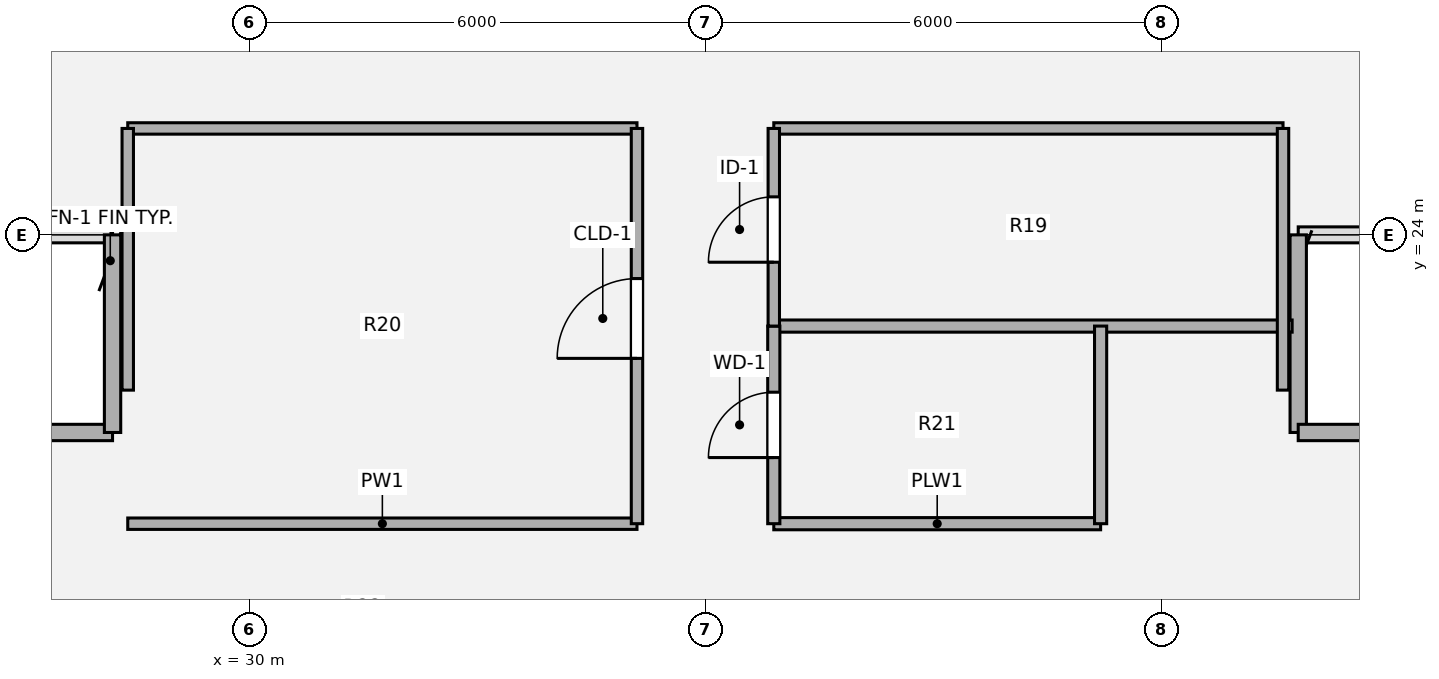
"""IFC4 building model, lengths in metres.
Left out: names, types, materials, properties, quantities, classifications, styles, units other than length and angle.
Written with IfcOpenShell. Run it as: python <this file> out.ifc"""

import sys

from ifc_helpers import new_model, si_unit, direction, frame, frame_2d, origin, origin_2d, place, context, subcontext, project, spatial, rectangle, extrude, source, transform, mapped, element, fill, save


model = new_model("IFC4")
c1 = context("Model", 3, precision=1e-05, world=origin(), true_north=direction((0.0, 1.0)))
c2 = subcontext(c1, "Body", "Model", "MODEL_VIEW")
j1 = project(units=[si_unit("LENGTHUNIT", "METRE"), si_unit("PLANEANGLEUNIT", "RADIAN")], contexts=[c1])
p1 = place(None, origin())
s1 = spatial("IfcSite", under=j1, at=p1, CompositionType="ELEMENT")
p2 = place(p1, origin())
s2 = spatial("IfcBuilding", under=s1, at=p2, CompositionType="ELEMENT")
p3 = place(p2, frame((0.0, 0.0, 89.82)))
s3 = spatial("IfcBuildingStorey", under=s2, at=p3, CompositionType="ELEMENT", Elevation=89.82)
p4 = place(p3, frame((24.35, 21.4, 0.0), z_axis=(0.0, 0.0, 1.0), x_axis=(1.0, 0.0, 0.0)))
e1 = element("IfcWall", 1, at=p4, inside=s3, PredefinedType="SOLIDWALL", context=c2, shape_type="SweptSolid", body=[
    extrude(rectangle(XDim=3.85, YDim=0.215, at=frame_2d((1.925, 0.0))), origin(), (0.0, 0.0, 1.0), 3.53),
])
for number, where, z_axis, x_axis in (
    (2, (28.2, 21.4, 0.0), (0.0, 0.0, 1.0), (0.0, 1.0, 0.0)),
    (3, (43.8, 24.0, 0.0), (0.0, 0.0, 1.0), (0.0, -1.0, 0.0)),
):
    element("IfcWall", number, at=place(p3, frame(where, z_axis=z_axis, x_axis=x_axis)), inside=s3, PredefinedType="SOLIDWALL", context=c2, shape_type="SweptSolid", body=[
        extrude(rectangle(XDim=2.6, YDim=0.215, at=frame_2d((1.3, 0.0))), origin(), (0.0, 0.0, 1.0), 3.53),
    ])
p5 = place(p3, frame((43.8, 21.4, 0.0), z_axis=(0.0, 0.0, 1.0), x_axis=(1.0, 0.0, 0.0)))
e4 = element("IfcWall", 4, at=p5, inside=s3, PredefinedType="SOLIDWALL", context=c2, shape_type="SweptSolid", body=[
    extrude(rectangle(XDim=3.85, YDim=0.215, at=frame_2d((1.925, 0.0))), origin(), (0.0, 0.0, 1.0), 3.53),
])
p6 = place(p3, frame((28.4, 20.2, 0.0), z_axis=(0.0, 0.0, 1.0), x_axis=(1.0, 0.0, 0.0)))
e5 = element("IfcWall", 5, at=p6, inside=s3, PredefinedType="PARTITIONING", context=c2, shape_type="SweptSolid", body=[
    extrude(rectangle(XDim=6.7, YDim=0.15, at=frame_2d((3.35, 0.0))), origin(), (0.0, 0.0, 1.0), 3.5),
])
p7 = place(p3, frame((36.9, 20.2, 0.0), z_axis=(0.0, 0.0, 1.0), x_axis=(1.0, 0.0, 0.0)))
e6 = element("IfcWall", 6, at=p7, inside=s3, PredefinedType="PLUMBINGWALL", context=c2, shape_type="SweptSolid", body=[
    extrude(rectangle(XDim=4.3, YDim=0.16, at=frame_2d((2.15, 0.0))), origin(), (0.0, 0.0, 1.0), 3.5),
])
p8 = place(p3, frame((36.9, 22.8, 0.0), z_axis=(0.0, 0.0, 1.0), x_axis=(1.0, 0.0, 0.0)))
e7 = element("IfcWall", 7, at=p8, inside=s3, PredefinedType="PLUMBINGWALL", context=c2, shape_type="SweptSolid", body=[
    extrude(rectangle(XDim=6.82, YDim=0.16, at=frame_2d((3.41, 0.0))), origin(), (0.0, 0.0, 1.0), 3.5),
])
for number, where, z_axis, x_axis in (
    (8, (28.4, 25.4, 0.0), (0.0, 0.0, 1.0), (1.0, 0.0, 0.0)),
    (9, (36.9, 25.4, 0.0), (0.0, 0.0, 1.0), (1.0, 0.0, 0.0)),
):
    element("IfcWall", number, at=place(p3, frame(where, z_axis=z_axis, x_axis=x_axis)), inside=s3, PredefinedType="PARTITIONING", context=c2, shape_type="SweptSolid", body=[
        extrude(rectangle(XDim=6.7, YDim=0.15, at=frame_2d((3.35, 0.0))), origin(), (0.0, 0.0, 1.0), 3.5),
    ])
p9 = place(p3, frame((28.4, 21.957, 0.0), z_axis=(0.0, 0.0, 1.0), x_axis=(0.0, 1.0, 0.0)))
e10 = element("IfcWall", 10, at=p9, inside=s3, PredefinedType="PARTITIONING", context=c2, shape_type="SweptSolid", body=[
    extrude(rectangle(XDim=3.443, YDim=0.15, at=frame_2d((1.721, 0.0))), origin(), (0.0, 0.0, 1.0), 3.5),
])
p10 = place(p3, frame((35.1, 20.2, 0.0), z_axis=(0.0, 0.0, 1.0), x_axis=(0.0, 1.0, 0.0)))
e11 = element("IfcWall", 11, at=p10, inside=s3, PredefinedType="PARTITIONING", context=c2, shape_type="SweptSolid", body=[
    extrude(rectangle(XDim=5.2, YDim=0.15, at=frame_2d((2.6, 0.0))), origin(), (0.0, 0.0, 1.0), 3.5),
])
p11 = place(p10, frame((2.175, 0.0, 0.0)))
e12 = element("IfcOpeningElement", 12, at=p11, cuts=e11, PredefinedType="OPENING", context=c2, shape_type="SweptSolid", body=[
    extrude(rectangle(XDim=1.05, YDim=2.1, at=origin_2d()), frame((0.525, 0.085, 1.05), z_axis=(0.0, -1.0, 0.0), x_axis=(1.0, 0.0, 0.0)), (0.0, 0.0, 1.0), 0.17),
])
p12 = place(p3, frame((36.9, 20.2, 0.0), z_axis=(0.0, 0.0, 1.0), x_axis=(0.0, 1.0, 0.0)))
e13 = element("IfcWall", 13, at=p12, inside=s3, PredefinedType="PLUMBINGWALL", context=c2, shape_type="SweptSolid", body=[
    extrude(rectangle(XDim=2.6, YDim=0.16, at=frame_2d((1.3, 0.0))), origin(), (0.0, 0.0, 1.0), 3.5),
])
p13 = place(p12, frame((0.87, 0.0, 0.0)))
e14 = element("IfcOpeningElement", 14, at=p13, cuts=e13, PredefinedType="OPENING", context=c2, shape_type="SweptSolid", body=[
    extrude(rectangle(XDim=0.86, YDim=2.1, at=origin_2d()), frame((0.43, 0.09, 1.05), z_axis=(0.0, -1.0, 0.0), x_axis=(1.0, 0.0, 0.0)), (0.0, 0.0, 1.0), 0.18),
])
p14 = place(p3, frame((36.9, 22.8, 0.0), z_axis=(0.0, 0.0, 1.0), x_axis=(0.0, 1.0, 0.0)))
e15 = element("IfcWall", 15, at=p14, inside=s3, PredefinedType="PARTITIONING", context=c2, shape_type="SweptSolid", body=[
    extrude(rectangle(XDim=2.6, YDim=0.15, at=frame_2d((1.3, 0.0))), origin(), (0.0, 0.0, 1.0), 3.5),
])
p15 = place(p14, frame((0.84, 0.0, 0.0)))
e16 = element("IfcOpeningElement", 16, at=p15, cuts=e15, PredefinedType="OPENING", context=c2, shape_type="SweptSolid", body=[
    extrude(rectangle(XDim=0.86, YDim=2.1, at=origin_2d()), frame((0.43, 0.085, 1.05), z_axis=(0.0, -1.0, 0.0), x_axis=(1.0, 0.0, 0.0)), (0.0, 0.0, 1.0), 0.17),
])
p16 = place(p3, frame((41.2, 20.2, 0.0), z_axis=(0.0, 0.0, 1.0), x_axis=(0.0, 1.0, 0.0)))
e17 = element("IfcWall", 17, at=p16, inside=s3, PredefinedType="PLUMBINGWALL", context=c2, shape_type="SweptSolid", body=[
    extrude(rectangle(XDim=2.6, YDim=0.16, at=frame_2d((1.3, 0.0))), origin(), (0.0, 0.0, 1.0), 2.815),
])
p17 = place(p3, frame((43.6, 21.958, 0.0), z_axis=(0.0, 0.0, 1.0), x_axis=(0.0, 1.0, 0.0)))
e18 = element("IfcWall", 18, at=p17, inside=s3, PredefinedType="PARTITIONING", context=c2, shape_type="SweptSolid", body=[
    extrude(rectangle(XDim=3.442, YDim=0.15, at=frame_2d((1.721, 0.0))), origin(), (0.0, 0.0, 1.0), 3.5),
])
m1 = source(origin(), c2, "Body", "SweptSolid", [
    extrude(rectangle(XDim=1.05, YDim=2.1, at=origin_2d()), frame((0.525, 0.025, 1.05), z_axis=(0.0, -1.0, 0.0), x_axis=(1.0, 0.0, 0.0)), (0.0, 0.0, 1.0), 0.05),
])
p18 = place(p11, origin())
e19 = element("IfcDoor", 19, at=p18, inside=s3, OperationType="SINGLE_SWING_LEFT", PredefinedType="DOOR", context=c2, shape_type="MappedRepresentation", body=[
    mapped(m1, transform((0.0, 0.0, 0.0), x_axis=(1.0, 0.0, 0.0), y_axis=(0.0, 1.0, 0.0), z_axis=(0.0, 0.0, 1.0), scale=1.0)),
])
fill(e12, e19)
m2 = source(origin(), c2, "Body", "SweptSolid", [
    extrude(rectangle(XDim=0.86, YDim=2.1, at=origin_2d()), frame((0.43, 0.025, 1.05), z_axis=(0.0, -1.0, 0.0), x_axis=(1.0, 0.0, 0.0)), (0.0, 0.0, 1.0), 0.05),
])
p19 = place(p13, origin())
e20 = element("IfcDoor", 20, at=p19, inside=s3, OperationType="SINGLE_SWING_LEFT", PredefinedType="DOOR", context=c2, shape_type="MappedRepresentation", body=[
    mapped(m2, transform((0.0, 0.0, 0.0), x_axis=(1.0, 0.0, 0.0), y_axis=(0.0, 1.0, 0.0), z_axis=(0.0, 0.0, 1.0), scale=1.0)),
])
fill(e14, e20)
m3 = source(origin(), c2, "Body", "SweptSolid", [
    extrude(rectangle(XDim=0.86, YDim=2.1, at=origin_2d()), frame((0.43, 0.025, 1.05), z_axis=(0.0, -1.0, 0.0), x_axis=(1.0, 0.0, 0.0)), (0.0, 0.0, 1.0), 0.05),
])
p20 = place(p15, origin())
e21 = element("IfcDoor", 21, at=p20, inside=s3, OperationType="SINGLE_SWING_LEFT", PredefinedType="DOOR", context=c2, shape_type="MappedRepresentation", body=[
    mapped(m3, transform((0.0, 0.0, 0.0), x_axis=(1.0, 0.0, 0.0), y_axis=(0.0, 1.0, 0.0), z_axis=(0.0, 0.0, 1.0), scale=1.0)),
])
fill(e16, e21)
save(model, sys.argv[1])
